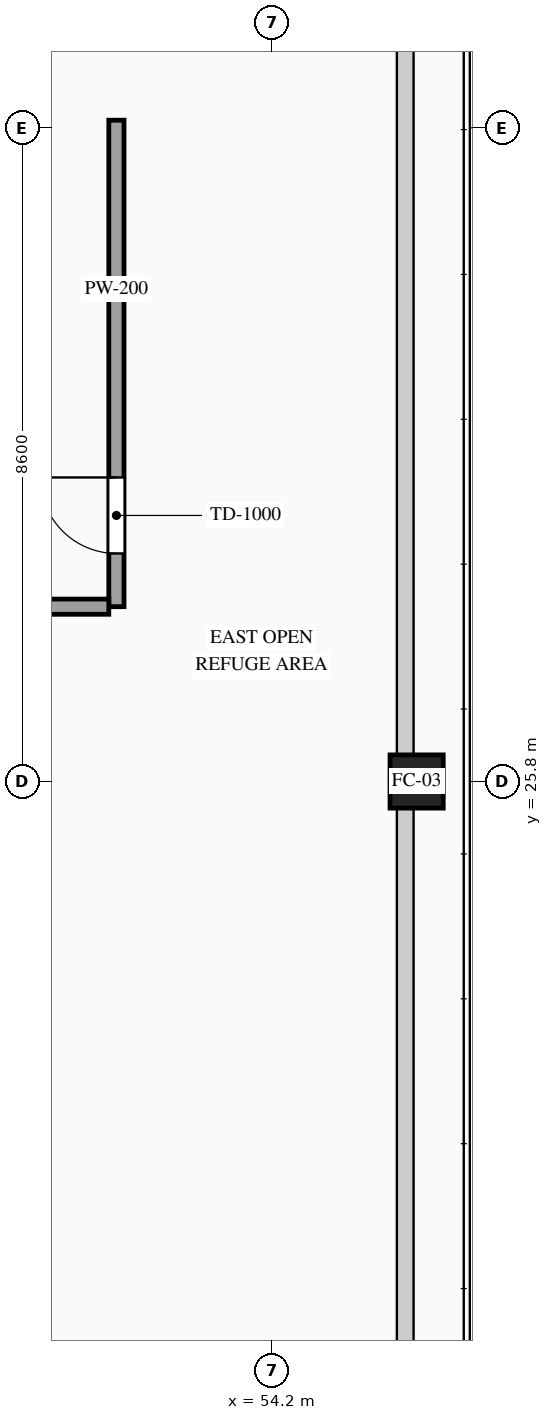
"""IFC4 building model, lengths in metres.
Left out: names, types, materials, properties, quantities, classifications, styles, units other than length and angle.
Written with IfcOpenShell. Run it as: python <this file> out.ifc"""

import sys

from ifc_helpers import new_model, si_unit, direction, frame, frame_2d, origin, origin_2d, place, context, subcontext, project, spatial, rectangle, hollow_rectangle, extrude, source, transform, mapped, element, fill, save


model = new_model("IFC4")
c1 = context("Model", 3, precision=1e-05, world=origin(), true_north=direction((0.0, 1.0)))
c2 = subcontext(c1, "Body", "Model", "MODEL_VIEW")
j1 = project(units=[si_unit("LENGTHUNIT", "METRE"), si_unit("PLANEANGLEUNIT", "RADIAN")], contexts=[c1])
p1 = place(None, origin())
s1 = spatial("IfcSite", under=j1, at=p1, CompositionType="ELEMENT")
p2 = place(p1, origin())
s2 = spatial("IfcBuilding", under=s1, at=p2, CompositionType="ELEMENT")
p3 = place(p2, frame((0.0, 0.0, 306.6)))
s3 = spatial("IfcBuildingStorey", under=s2, at=p3, CompositionType="ELEMENT", Elevation=306.6)
m1 = source(origin(), c2, "Body", "SweptSolid", [
    extrude(hollow_rectangle(XDim=0.7, YDim=0.7, WallThickness=0.032, at=origin_2d()), origin(), (0.0, 0.0, 1.0), 4.6),
])
p4 = place(p3, frame((56.1, 25.8, 0.0), z_axis=(0.0, 0.0, 1.0), x_axis=(1.0, 0.0, 0.0)))
e1 = element("IfcColumn", 1, at=p4, inside=s3, PredefinedType="COLUMN", context=c2, shape_type="MappedRepresentation", body=[
    mapped(m1, transform((0.0, 0.0, 0.0), scale=1.0)),
])
p5 = place(p3, frame((52.15, 28.1, 0.0), z_axis=(0.0, 0.0, 1.0), x_axis=(0.0, 1.0, 0.0)))
e2 = element("IfcWall", 2, at=p5, inside=s3, PredefinedType="PARTITIONING", context=c2, shape_type="SweptSolid", body=[
    extrude(rectangle(XDim=6.4, YDim=0.2, at=frame_2d((3.2, 0.0))), origin(), (0.0, 0.0, 1.0), 4.38),
])
p6 = place(p5, frame((0.7, 0.0, 0.0)))
e3 = element("IfcOpeningElement", 3, at=p6, cuts=e2, PredefinedType="OPENING", context=c2, shape_type="SweptSolid", body=[
    extrude(rectangle(XDim=1.0, YDim=2.2, at=frame_2d((0.5, 1.1))), frame((0.0, 0.115, 0.0), z_axis=(0.0, -1.0, 0.0), x_axis=(1.0, 0.0, 0.0)), (0.0, 0.0, 1.0), 0.23),
])
m2 = source(origin(), c2, "Body", "SweptSolid", [
    extrude(rectangle(XDim=1.59, YDim=0.2, at=frame_2d((0.795, 0.0))), origin(), (0.0, 0.0, 1.0), 4.38),
])
p7 = place(p3, frame((50.46, 28.1, 0.0), z_axis=(0.0, 0.0, 1.0), x_axis=(1.0, 0.0, 0.0)))
e4 = element("IfcWall", 4, at=p7, inside=s3, PredefinedType="PARTITIONING", context=c2, shape_type="MappedRepresentation", body=[
    mapped(m2, transform((0.0, 0.0, 0.0), scale=1.0)),
])
m3 = source(origin(), c2, "Body", "SweptSolid", [
    extrude(rectangle(XDim=1.0, YDim=2.2, at=frame_2d((0.5, 1.1))), frame((0.0, 0.025, 0.0), z_axis=(0.0, -1.0, 0.0), x_axis=(1.0, 0.0, 0.0)), (0.0, 0.0, 1.0), 0.05),
])
p8 = place(p6, origin())
e5 = element("IfcDoor", 5, at=p8, inside=s3, OperationType="SINGLE_SWING_RIGHT", PredefinedType="DOOR", context=c2, shape_type="MappedRepresentation", body=[
    mapped(m3, transform((0.0, 0.0, 0.0), scale=1.0)),
])
fill(e3, e5)
save(model, sys.argv[1])
